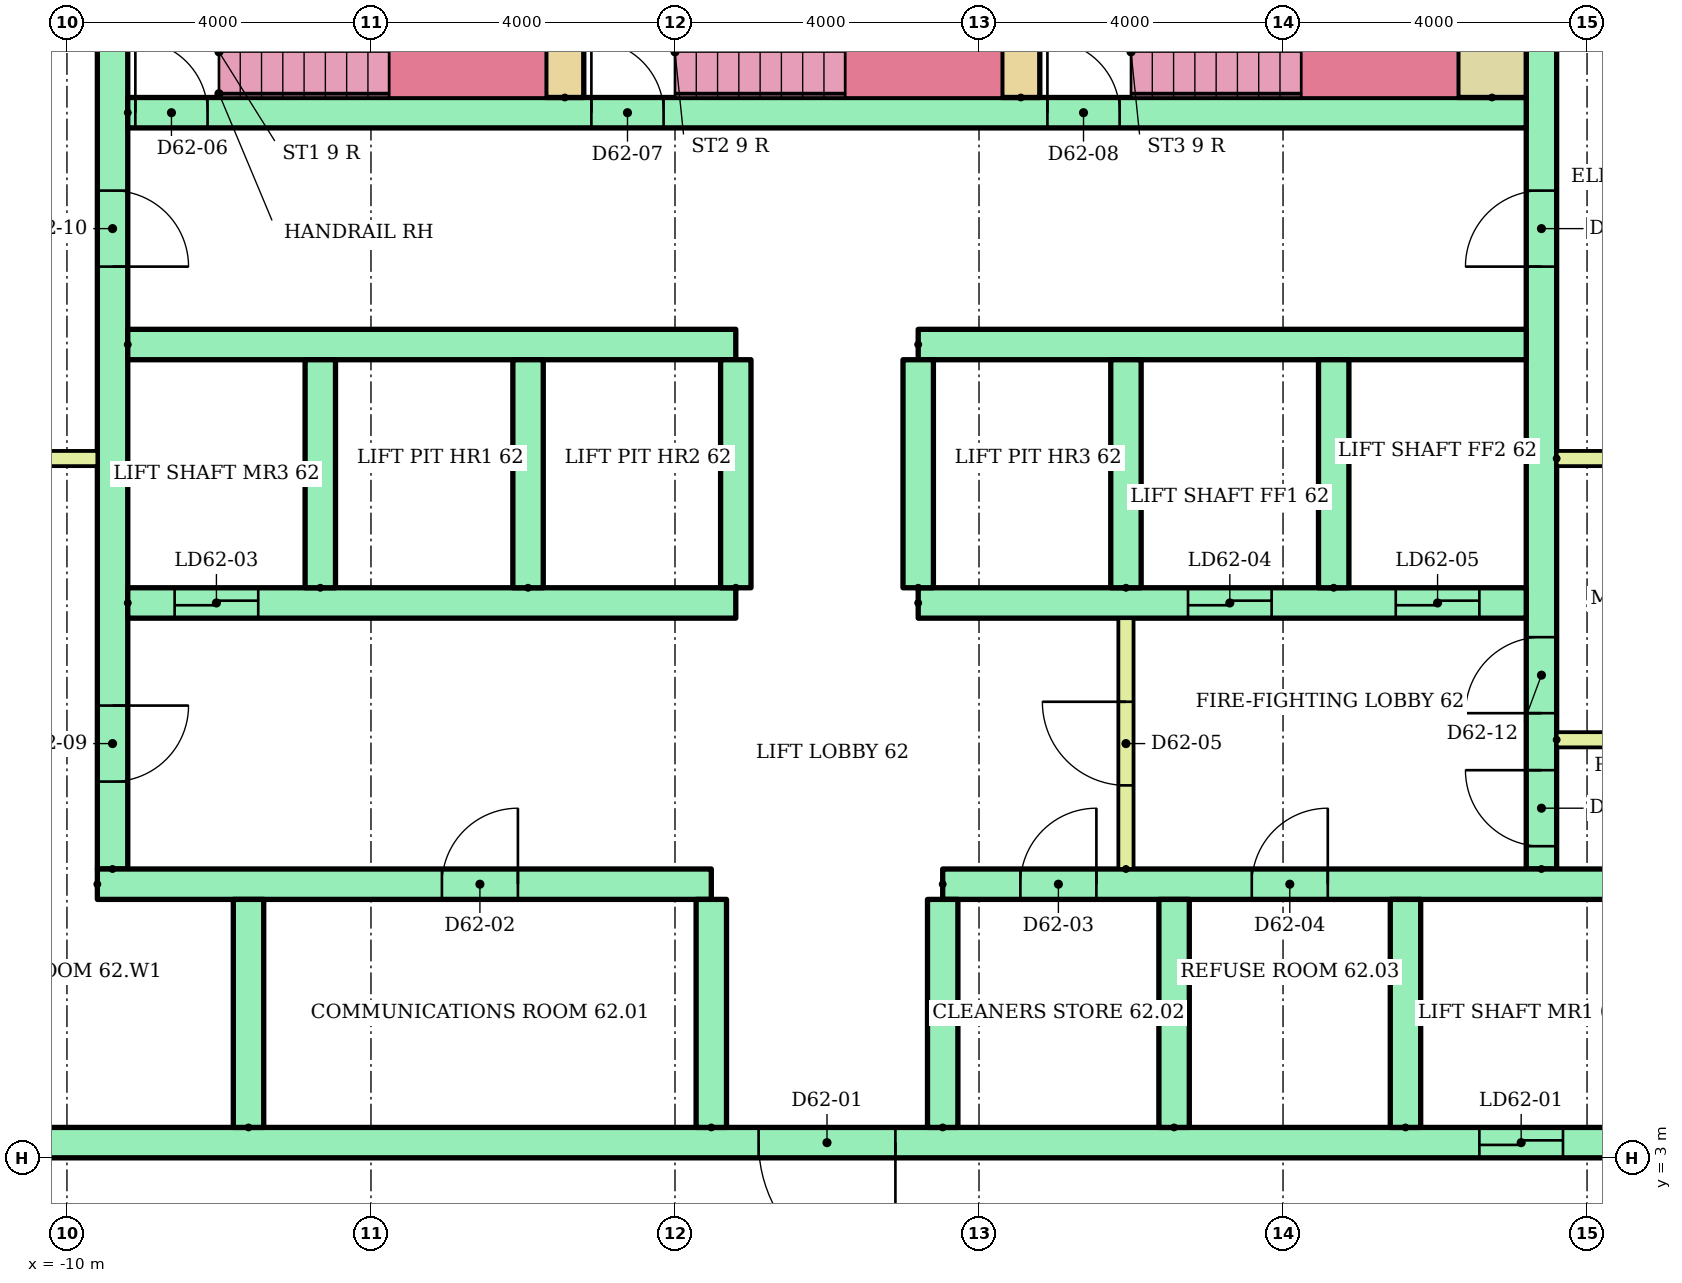
"""IFC4 building model, lengths in metres.
Left out: names, types, materials, properties, quantities, classifications, styles, units other than length and angle.
Written with IfcOpenShell. Run it as: python <this file> out.ifc"""

import sys

from ifc_helpers import new_model, si_unit, direction, frame, frame_2d, origin, place, context, subcontext, project, spatial, rectangle, extrude, element, fill, save


model = new_model("IFC4")
c1 = context("Model", 3, precision=1e-05, world=origin(), true_north=direction((0.0, 1.0)))
c2 = subcontext(c1, "Body", "Model", "MODEL_VIEW")
j1 = project(units=[si_unit("LENGTHUNIT", "METRE"), si_unit("PLANEANGLEUNIT", "RADIAN")], contexts=[c1])
p1 = place(None, origin())
s1 = spatial("IfcSite", under=j1, at=p1, CompositionType="ELEMENT")
p2 = place(p1, origin())
s2 = spatial("IfcBuilding", under=s1, at=p2, CompositionType="ELEMENT")
p3 = place(p2, frame((0.0, 0.0, 236.4)))
s3 = spatial("IfcBuildingStorey", under=s2, at=p3, CompositionType="ELEMENT", Elevation=236.4)
p4 = place(p3, frame((-9.4, 6.8, 0.0), z_axis=(0.0, 0.0, 1.0), x_axis=(0.0, 1.0, 0.0)))
e1 = element("IfcWall", 1, at=p4, inside=s3, PredefinedType="SHEAR", context=c2, shape_type="SweptSolid", body=[
    extrude(rectangle(XDim=12.7, YDim=0.4, at=frame_2d((6.35, 0.0))), origin(), (0.0, 0.0, 1.0), 2.8),
])
p5 = place(p4, frame((1.15, 0.0, 0.0)))
e2 = element("IfcOpeningElement", 2, at=p5, cuts=e1, PredefinedType="OPENING", context=c2, shape_type="SweptSolid", body=[
    extrude(rectangle(XDim=1.0, YDim=2.1, at=frame_2d((0.5, 1.05))), frame((0.0, 0.21, 0.0), z_axis=(0.0, -1.0, 0.0), x_axis=(1.0, 0.0, 0.0)), (0.0, 0.0, 1.0), 0.42),
])
p6 = place(p4, frame((7.925, 0.0, 0.0)))
e3 = element("IfcOpeningElement", 3, at=p6, cuts=e1, PredefinedType="OPENING", context=c2, shape_type="SweptSolid", body=[
    extrude(rectangle(XDim=1.0, YDim=2.1, at=frame_2d((0.5, 1.05))), frame((0.0, 0.21, 0.0), z_axis=(0.0, -1.0, 0.0), x_axis=(1.0, 0.0, 0.0)), (0.0, 0.0, 1.0), 0.42),
])
p7 = place(p3, frame((9.4, 6.8, 0.0), z_axis=(0.0, 0.0, 1.0), x_axis=(0.0, 1.0, 0.0)))
e4 = element("IfcWall", 4, at=p7, inside=s3, PredefinedType="SHEAR", context=c2, shape_type="SweptSolid", body=[
    extrude(rectangle(XDim=12.7, YDim=0.4, at=frame_2d((6.35, 0.0))), origin(), (0.0, 0.0, 1.0), 2.8),
])
p8 = place(p7, frame((0.3, 0.0, 0.0)))
e5 = element("IfcOpeningElement", 5, at=p8, cuts=e4, PredefinedType="OPENING", context=c2, shape_type="SweptSolid", body=[
    extrude(rectangle(XDim=1.0, YDim=2.1, at=frame_2d((0.5, 1.05))), frame((0.0, 0.21, 0.0), z_axis=(0.0, -1.0, 0.0), x_axis=(1.0, 0.0, 0.0)), (0.0, 0.0, 1.0), 0.42),
])
p9 = place(p7, frame((2.05, 0.0, 0.0)))
e6 = element("IfcOpeningElement", 6, at=p9, cuts=e4, PredefinedType="OPENING", context=c2, shape_type="SweptSolid", body=[
    extrude(rectangle(XDim=1.0, YDim=2.1, at=frame_2d((0.5, 1.05))), frame((0.0, 0.21, 0.0), z_axis=(0.0, -1.0, 0.0), x_axis=(1.0, 0.0, 0.0)), (0.0, 0.0, 1.0), 0.42),
])
p10 = place(p7, frame((7.925, 0.0, 0.0)))
e7 = element("IfcOpeningElement", 7, at=p10, cuts=e4, PredefinedType="OPENING", context=c2, shape_type="SweptSolid", body=[
    extrude(rectangle(XDim=1.0, YDim=2.1, at=frame_2d((0.5, 1.05))), frame((0.0, 0.21, 0.0), z_axis=(0.0, -1.0, 0.0), x_axis=(1.0, 0.0, 0.0)), (0.0, 0.0, 1.0), 0.42),
])
p11 = place(p3, frame((-13.5, 3.2, 0.0)))
e8 = element("IfcWall", 8, at=p11, inside=s3, PredefinedType="SHEAR", context=c2, shape_type="SweptSolid", body=[
    extrude(rectangle(XDim=27.0, YDim=0.4, at=frame_2d((13.5, 0.0))), origin(), (0.0, 0.0, 1.0), 2.8),
])
p12 = place(p11, frame((22.083, 0.0, 0.0)))
e9 = element("IfcOpeningElement", 9, at=p12, cuts=e8, PredefinedType="OPENING", context=c2, shape_type="SweptSolid", body=[
    extrude(rectangle(XDim=1.1, YDim=2.1, at=frame_2d((0.55, 1.05))), frame((0.0, 0.21, 0.0), z_axis=(0.0, -1.0, 0.0), x_axis=(1.0, 0.0, 0.0)), (0.0, 0.0, 1.0), 0.42),
])
p13 = place(p11, frame((25.128, 0.0, 0.0)))
e10 = element("IfcOpeningElement", 10, at=p13, cuts=e8, PredefinedType="OPENING", context=c2, shape_type="SweptSolid", body=[
    extrude(rectangle(XDim=1.1, YDim=2.1, at=frame_2d((0.55, 1.05))), frame((0.0, 0.21, 0.0), z_axis=(0.0, -1.0, 0.0), x_axis=(1.0, 0.0, 0.0)), (0.0, 0.0, 1.0), 0.42),
])
p14 = place(p11, frame((12.6, 0.0, 0.0)))
e11 = element("IfcOpeningElement", 11, at=p14, cuts=e8, PredefinedType="OPENING", context=c2, shape_type="SweptSolid", body=[
    extrude(rectangle(XDim=1.8, YDim=2.1, at=frame_2d((0.9, 1.05))), frame((0.0, 0.21, 0.0), z_axis=(0.0, -1.0, 0.0), x_axis=(1.0, 0.0, 0.0)), (0.0, 0.0, 1.0), 0.42),
])
p15 = place(p3, frame((-9.6, 6.6, 0.0)))
e12 = element("IfcWall", 12, at=p15, inside=s3, PredefinedType="SHEAR", context=c2, shape_type="SweptSolid", body=[
    extrude(rectangle(XDim=8.078, YDim=0.4, at=frame_2d((4.039, 0.0))), origin(), (0.0, 0.0, 1.0), 2.8),
])
p16 = place(p15, frame((4.533, 0.0, 0.0)))
e13 = element("IfcOpeningElement", 13, at=p16, cuts=e12, PredefinedType="OPENING", context=c2, shape_type="SweptSolid", body=[
    extrude(rectangle(XDim=1.0, YDim=2.1, at=frame_2d((0.5, 1.05))), frame((0.0, 0.21, 0.0), z_axis=(0.0, -1.0, 0.0), x_axis=(1.0, 0.0, 0.0)), (0.0, 0.0, 1.0), 0.42),
])
p17 = place(p3, frame((1.522, 6.6, 0.0)))
e14 = element("IfcWall", 14, at=p17, inside=s3, PredefinedType="SHEAR", context=c2, shape_type="SweptSolid", body=[
    extrude(rectangle(XDim=11.978, YDim=0.4, at=frame_2d((5.989, 0.0))), origin(), (0.0, 0.0, 1.0), 2.8),
])
p18 = place(p17, frame((1.022, 0.0, 0.0)))
e15 = element("IfcOpeningElement", 15, at=p18, cuts=e14, PredefinedType="OPENING", context=c2, shape_type="SweptSolid", body=[
    extrude(rectangle(XDim=1.0, YDim=2.1, at=frame_2d((0.5, 1.05))), frame((0.0, 0.21, 0.0), z_axis=(0.0, -1.0, 0.0), x_axis=(1.0, 0.0, 0.0)), (0.0, 0.0, 1.0), 0.42),
])
p19 = place(p17, frame((4.067, 0.0, 0.0)))
e16 = element("IfcOpeningElement", 16, at=p19, cuts=e14, PredefinedType="OPENING", context=c2, shape_type="SweptSolid", body=[
    extrude(rectangle(XDim=1.0, YDim=2.1, at=frame_2d((0.5, 1.05))), frame((0.0, 0.21, 0.0), z_axis=(0.0, -1.0, 0.0), x_axis=(1.0, 0.0, 0.0)), (0.0, 0.0, 1.0), 0.42),
])
for number, where, z_axis, x_axis in (
    (17, (-7.611, 3.4, 0.0), (0.0, 0.0, 1.0), (0.0, 1.0, 0.0)),
    (18, (-1.522, 3.4, 0.0), (0.0, 0.0, 1.0), (0.0, 1.0, 0.0)),
    (19, (1.522, 3.4, 0.0), (0.0, 0.0, 1.0), (0.0, 1.0, 0.0)),
    (20, (4.567, 3.4, 0.0), (0.0, 0.0, 1.0), (0.0, 1.0, 0.0)),
    (21, (7.611, 3.4, 0.0), (0.0, 0.0, 1.0), (0.0, 1.0, 0.0)),
):
    element("IfcWall", number, at=place(p3, frame(where, z_axis=z_axis, x_axis=x_axis)), inside=s3, PredefinedType="SHEAR", context=c2, shape_type="SweptSolid", body=[
        extrude(rectangle(XDim=3.0, YDim=0.4, at=frame_2d((1.5, 0.0))), origin(), (0.0, 0.0, 1.0), 2.8),
    ])
p20 = place(p3, frame((-9.2, 10.3, 0.0)))
e22 = element("IfcWall", 22, at=p20, inside=s3, PredefinedType="SHEAR", context=c2, shape_type="SweptSolid", body=[
    extrude(rectangle(XDim=8.0, YDim=0.4, at=frame_2d((4.0, 0.0))), origin(), (0.0, 0.0, 1.0), 2.8),
])
p21 = place(p20, frame((0.617, 0.0, 0.0)))
e23 = element("IfcOpeningElement", 23, at=p21, cuts=e22, PredefinedType="OPENING", context=c2, shape_type="SweptSolid", body=[
    extrude(rectangle(XDim=1.1, YDim=2.1, at=frame_2d((0.55, 1.05))), frame((0.0, 0.21, 0.0), z_axis=(0.0, -1.0, 0.0), x_axis=(1.0, 0.0, 0.0)), (0.0, 0.0, 1.0), 0.42),
])
p22 = place(p3, frame((-9.2, 13.7, 0.0)))
e24 = element("IfcWall", 24, at=p22, inside=s3, PredefinedType="SHEAR", context=c2, shape_type="SweptSolid", body=[
    extrude(rectangle(XDim=8.0, YDim=0.4, at=frame_2d((4.0, 0.0))), origin(), (0.0, 0.0, 1.0), 2.8),
])
p23 = place(p3, frame((1.2, 10.3, 0.0)))
e25 = element("IfcWall", 25, at=p23, inside=s3, PredefinedType="SHEAR", context=c2, shape_type="SweptSolid", body=[
    extrude(rectangle(XDim=8.0, YDim=0.4, at=frame_2d((4.0, 0.0))), origin(), (0.0, 0.0, 1.0), 2.8),
])
p24 = place(p23, frame((3.55, 0.0, 0.0)))
e26 = element("IfcOpeningElement", 26, at=p24, cuts=e25, PredefinedType="OPENING", context=c2, shape_type="SweptSolid", body=[
    extrude(rectangle(XDim=1.1, YDim=2.1, at=frame_2d((0.55, 1.05))), frame((0.0, 0.21, 0.0), z_axis=(0.0, -1.0, 0.0), x_axis=(1.0, 0.0, 0.0)), (0.0, 0.0, 1.0), 0.42),
])
p25 = place(p23, frame((6.283, 0.0, 0.0)))
e27 = element("IfcOpeningElement", 27, at=p25, cuts=e25, PredefinedType="OPENING", context=c2, shape_type="SweptSolid", body=[
    extrude(rectangle(XDim=1.1, YDim=2.1, at=frame_2d((0.55, 1.05))), frame((0.0, 0.21, 0.0), z_axis=(0.0, -1.0, 0.0), x_axis=(1.0, 0.0, 0.0)), (0.0, 0.0, 1.0), 0.42),
])
p26 = place(p3, frame((1.2, 13.7, 0.0)))
e28 = element("IfcWall", 28, at=p26, inside=s3, PredefinedType="SHEAR", context=c2, shape_type="SweptSolid", body=[
    extrude(rectangle(XDim=8.0, YDim=0.4, at=frame_2d((4.0, 0.0))), origin(), (0.0, 0.0, 1.0), 2.8),
])
for number, where, z_axis, x_axis in (
    (29, (-6.667, 10.5, 0.0), (0.0, 0.0, 1.0), (0.0, 1.0, 0.0)),
    (30, (-3.933, 10.5, 0.0), (0.0, 0.0, 1.0), (0.0, 1.0, 0.0)),
    (31, (-1.2, 10.5, 0.0), (0.0, 0.0, 1.0), (0.0, 1.0, 0.0)),
    (32, (1.2, 10.5, 0.0), (0.0, 0.0, 1.0), (0.0, 1.0, 0.0)),
    (33, (3.933, 10.5, 0.0), (0.0, 0.0, 1.0), (0.0, 1.0, 0.0)),
    (34, (6.667, 10.5, 0.0), (0.0, 0.0, 1.0), (0.0, 1.0, 0.0)),
):
    element("IfcWall", number, at=place(p3, frame(where, z_axis=z_axis, x_axis=x_axis)), inside=s3, PredefinedType="SHEAR", context=c2, shape_type="SweptSolid", body=[
        extrude(rectangle(XDim=3.0, YDim=0.4, at=frame_2d((1.5, 0.0))), origin(), (0.0, 0.0, 1.0), 2.8),
    ])
p27 = place(p3, frame((3.933, 6.8, 0.0), z_axis=(0.0, 0.0, 1.0), x_axis=(0.0, 1.0, 0.0)))
e35 = element("IfcWall", 35, at=p27, inside=s3, PredefinedType="PARTITIONING", context=c2, shape_type="SweptSolid", body=[
    extrude(rectangle(XDim=3.3, YDim=0.2, at=frame_2d((1.65, 0.0))), origin(), (0.0, 0.0, 1.0), 2.8),
])
p28 = place(p27, frame((1.1, 0.0, 0.0)))
e36 = element("IfcOpeningElement", 36, at=p28, cuts=e35, PredefinedType="OPENING", context=c2, shape_type="SweptSolid", body=[
    extrude(rectangle(XDim=1.1, YDim=2.1, at=frame_2d((0.55, 1.05))), frame((0.0, 0.11, 0.0), z_axis=(0.0, -1.0, 0.0), x_axis=(1.0, 0.0, 0.0)), (0.0, 0.0, 1.0), 0.22),
])
p29 = place(p3, frame((-9.2, 16.75, 0.0)))
e37 = element("IfcWall", 37, at=p29, inside=s3, PredefinedType="SHEAR", context=c2, shape_type="SweptSolid", body=[
    extrude(rectangle(XDim=18.4, YDim=0.4, at=frame_2d((9.2, 0.0))), origin(), (0.0, 0.0, 1.0), 2.8),
])
p30 = place(p29, frame((0.1, 0.0, 0.0)))
e38 = element("IfcOpeningElement", 38, at=p30, cuts=e37, PredefinedType="OPENING", context=c2, shape_type="SweptSolid", body=[
    extrude(rectangle(XDim=0.95, YDim=2.1, at=frame_2d((0.475, 1.05))), frame((0.0, 0.21, 0.0), z_axis=(0.0, -1.0, 0.0), x_axis=(1.0, 0.0, 0.0)), (0.0, 0.0, 1.0), 0.42),
])
p31 = place(p29, frame((6.1, 0.0, 0.0)))
e39 = element("IfcOpeningElement", 39, at=p31, cuts=e37, PredefinedType="OPENING", context=c2, shape_type="SweptSolid", body=[
    extrude(rectangle(XDim=0.95, YDim=2.1, at=frame_2d((0.475, 1.05))), frame((0.0, 0.21, 0.0), z_axis=(0.0, -1.0, 0.0), x_axis=(1.0, 0.0, 0.0)), (0.0, 0.0, 1.0), 0.42),
])
p32 = place(p29, frame((12.1, 0.0, 0.0)))
e40 = element("IfcOpeningElement", 40, at=p32, cuts=e37, PredefinedType="OPENING", context=c2, shape_type="SweptSolid", body=[
    extrude(rectangle(XDim=0.95, YDim=2.1, at=frame_2d((0.475, 1.05))), frame((0.0, 0.21, 0.0), z_axis=(0.0, -1.0, 0.0), x_axis=(1.0, 0.0, 0.0)), (0.0, 0.0, 1.0), 0.42),
])
for number, where, z_axis, x_axis in (
    (41, (-3.45, 16.95, 0.0), (0.0, 0.0, 1.0), (0.0, 1.0, 0.0)),
    (42, (2.55, 16.95, 0.0), (0.0, 0.0, 1.0), (0.0, 1.0, 0.0)),
):
    element("IfcWall", number, at=place(p3, frame(where, z_axis=z_axis, x_axis=x_axis)), inside=s3, PredefinedType="SHEAR", context=c2, shape_type="SweptSolid", body=[
        extrude(rectangle(XDim=2.55, YDim=0.5, at=frame_2d((1.275, 0.0))), origin(), (0.0, 0.0, 1.0), 2.8),
    ])
p33 = place(p3, frame((8.75, 16.95, 0.0), z_axis=(0.0, 0.0, 1.0), x_axis=(0.0, 1.0, 0.0)))
e43 = element("IfcWall", 43, at=p33, inside=s3, PredefinedType="SHEAR", context=c2, shape_type="SweptSolid", body=[
    extrude(rectangle(XDim=2.55, YDim=0.9, at=frame_2d((1.275, 0.0))), origin(), (0.0, 0.0, 1.0), 2.8),
])
for number, where in (
    (44, (-13.5, 12.2, 0.0)),
    (45, (9.6, 8.5, 0.0)),
    (46, (9.6, 12.2, 0.0)),
):
    element("IfcWall", number, at=place(p3, frame(where)), inside=s3, PredefinedType="PARTITIONING", context=c2, shape_type="SweptSolid", body=[
        extrude(rectangle(XDim=3.9, YDim=0.2, at=frame_2d((1.95, 0.0))), origin(), (0.0, 0.0, 1.0), 2.8),
    ])
p34 = place(p12, origin())
e47 = element("IfcDoor", 47, at=p34, inside=s3, OperationType="SLIDING_TO_LEFT", PredefinedType="DOOR", context=c2, shape_type="SweptSolid", body=[
    extrude(rectangle(XDim=1.1, YDim=2.1, at=frame_2d((0.55, 1.05))), frame((0.0, 0.025, 0.0), z_axis=(0.0, -1.0, 0.0), x_axis=(1.0, 0.0, 0.0)), (0.0, 0.0, 1.0), 0.05),
])
fill(e9, e47)
p35 = place(p14, frame((1.8, 0.0, 0.0), z_axis=(0.0, 0.0, 1.0), x_axis=(-1.0, 0.0, 0.0)))
e48 = element("IfcDoor", 48, at=p35, inside=s3, OperationType="DOUBLE_DOOR_SINGLE_SWING", PredefinedType="DOOR", context=c2, shape_type="SweptSolid", body=[
    extrude(rectangle(XDim=1.8, YDim=2.1, at=frame_2d((0.9, 1.05))), frame((0.0, 0.025, 0.0), z_axis=(0.0, -1.0, 0.0), x_axis=(1.0, 0.0, 0.0)), (0.0, 0.0, 1.0), 0.05),
])
fill(e11, e48)
p36 = place(p16, origin())
e49 = element("IfcDoor", 49, at=p36, inside=s3, OperationType="SINGLE_SWING_RIGHT", PredefinedType="DOOR", context=c2, shape_type="SweptSolid", body=[
    extrude(rectangle(XDim=1.0, YDim=2.1, at=frame_2d((0.5, 1.05))), frame((0.0, 0.025, 0.0), z_axis=(0.0, -1.0, 0.0), x_axis=(1.0, 0.0, 0.0)), (0.0, 0.0, 1.0), 0.05),
])
fill(e13, e49)
p37 = place(p18, origin())
e50 = element("IfcDoor", 50, at=p37, inside=s3, OperationType="SINGLE_SWING_RIGHT", PredefinedType="DOOR", context=c2, shape_type="SweptSolid", body=[
    extrude(rectangle(XDim=1.0, YDim=2.1, at=frame_2d((0.5, 1.05))), frame((0.0, 0.025, 0.0), z_axis=(0.0, -1.0, 0.0), x_axis=(1.0, 0.0, 0.0)), (0.0, 0.0, 1.0), 0.05),
])
fill(e15, e50)
p38 = place(p19, origin())
e51 = element("IfcDoor", 51, at=p38, inside=s3, OperationType="SINGLE_SWING_RIGHT", PredefinedType="DOOR", context=c2, shape_type="SweptSolid", body=[
    extrude(rectangle(XDim=1.0, YDim=2.1, at=frame_2d((0.5, 1.05))), frame((0.0, 0.025, 0.0), z_axis=(0.0, -1.0, 0.0), x_axis=(1.0, 0.0, 0.0)), (0.0, 0.0, 1.0), 0.05),
])
fill(e16, e51)
p39 = place(p21, origin())
e52 = element("IfcDoor", 52, at=p39, inside=s3, OperationType="SLIDING_TO_LEFT", PredefinedType="DOOR", context=c2, shape_type="SweptSolid", body=[
    extrude(rectangle(XDim=1.1, YDim=2.1, at=frame_2d((0.55, 1.05))), frame((0.0, 0.025, 0.0), z_axis=(0.0, -1.0, 0.0), x_axis=(1.0, 0.0, 0.0)), (0.0, 0.0, 1.0), 0.05),
])
fill(e23, e52)
p40 = place(p24, origin())
e53 = element("IfcDoor", 53, at=p40, inside=s3, OperationType="SLIDING_TO_LEFT", PredefinedType="DOOR", context=c2, shape_type="SweptSolid", body=[
    extrude(rectangle(XDim=1.1, YDim=2.1, at=frame_2d((0.55, 1.05))), frame((0.0, 0.025, 0.0), z_axis=(0.0, -1.0, 0.0), x_axis=(1.0, 0.0, 0.0)), (0.0, 0.0, 1.0), 0.05),
])
fill(e26, e53)
p41 = place(p25, origin())
e54 = element("IfcDoor", 54, at=p41, inside=s3, OperationType="SLIDING_TO_LEFT", PredefinedType="DOOR", context=c2, shape_type="SweptSolid", body=[
    extrude(rectangle(XDim=1.1, YDim=2.1, at=frame_2d((0.55, 1.05))), frame((0.0, 0.025, 0.0), z_axis=(0.0, -1.0, 0.0), x_axis=(1.0, 0.0, 0.0)), (0.0, 0.0, 1.0), 0.05),
])
fill(e27, e54)
p42 = place(p28, origin())
e55 = element("IfcDoor", 55, at=p42, inside=s3, OperationType="SINGLE_SWING_RIGHT", PredefinedType="DOOR", context=c2, shape_type="SweptSolid", body=[
    extrude(rectangle(XDim=1.1, YDim=2.1, at=frame_2d((0.55, 1.05))), frame((0.0, 0.025, 0.0), z_axis=(0.0, -1.0, 0.0), x_axis=(1.0, 0.0, 0.0)), (0.0, 0.0, 1.0), 0.05),
])
fill(e36, e55)
p43 = place(p30, origin())
e56 = element("IfcDoor", 56, at=p43, inside=s3, OperationType="SINGLE_SWING_LEFT", PredefinedType="DOOR", context=c2, shape_type="SweptSolid", body=[
    extrude(rectangle(XDim=0.95, YDim=2.1, at=frame_2d((0.475, 1.05))), frame((0.0, 0.025, 0.0), z_axis=(0.0, -1.0, 0.0), x_axis=(1.0, 0.0, 0.0)), (0.0, 0.0, 1.0), 0.05),
])
fill(e38, e56)
p44 = place(p31, origin())
e57 = element("IfcDoor", 57, at=p44, inside=s3, OperationType="SINGLE_SWING_LEFT", PredefinedType="DOOR", context=c2, shape_type="SweptSolid", body=[
    extrude(rectangle(XDim=0.95, YDim=2.1, at=frame_2d((0.475, 1.05))), frame((0.0, 0.025, 0.0), z_axis=(0.0, -1.0, 0.0), x_axis=(1.0, 0.0, 0.0)), (0.0, 0.0, 1.0), 0.05),
])
fill(e39, e57)
p45 = place(p32, origin())
e58 = element("IfcDoor", 58, at=p45, inside=s3, OperationType="SINGLE_SWING_LEFT", PredefinedType="DOOR", context=c2, shape_type="SweptSolid", body=[
    extrude(rectangle(XDim=0.95, YDim=2.1, at=frame_2d((0.475, 1.05))), frame((0.0, 0.025, 0.0), z_axis=(0.0, -1.0, 0.0), x_axis=(1.0, 0.0, 0.0)), (0.0, 0.0, 1.0), 0.05),
])
fill(e40, e58)
p46 = place(p5, frame((1.0, 0.0, 0.0), z_axis=(0.0, 0.0, 1.0), x_axis=(-1.0, 0.0, 0.0)))
e59 = element("IfcDoor", 59, at=p46, inside=s3, OperationType="SINGLE_SWING_RIGHT", PredefinedType="DOOR", context=c2, shape_type="SweptSolid", body=[
    extrude(rectangle(XDim=1.0, YDim=2.1, at=frame_2d((0.5, 1.05))), frame((0.0, 0.025, 0.0), z_axis=(0.0, -1.0, 0.0), x_axis=(1.0, 0.0, 0.0)), (0.0, 0.0, 1.0), 0.05),
])
fill(e2, e59)
p47 = place(p6, frame((1.0, 0.0, 0.0), z_axis=(0.0, 0.0, 1.0), x_axis=(-1.0, 0.0, 0.0)))
e60 = element("IfcDoor", 60, at=p47, inside=s3, OperationType="SINGLE_SWING_LEFT", PredefinedType="DOOR", context=c2, shape_type="SweptSolid", body=[
    extrude(rectangle(XDim=1.0, YDim=2.1, at=frame_2d((0.5, 1.05))), frame((0.0, 0.025, 0.0), z_axis=(0.0, -1.0, 0.0), x_axis=(1.0, 0.0, 0.0)), (0.0, 0.0, 1.0), 0.05),
])
fill(e3, e60)
p48 = place(p8, origin())
e61 = element("IfcDoor", 61, at=p48, inside=s3, OperationType="SINGLE_SWING_RIGHT", PredefinedType="DOOR", context=c2, shape_type="SweptSolid", body=[
    extrude(rectangle(XDim=1.0, YDim=2.1, at=frame_2d((0.5, 1.05))), frame((0.0, 0.025, 0.0), z_axis=(0.0, -1.0, 0.0), x_axis=(1.0, 0.0, 0.0)), (0.0, 0.0, 1.0), 0.05),
])
fill(e5, e61)
p49 = place(p9, origin())
e62 = element("IfcDoor", 62, at=p49, inside=s3, OperationType="SINGLE_SWING_LEFT", PredefinedType="DOOR", context=c2, shape_type="SweptSolid", body=[
    extrude(rectangle(XDim=1.0, YDim=2.1, at=frame_2d((0.5, 1.05))), frame((0.0, 0.025, 0.0), z_axis=(0.0, -1.0, 0.0), x_axis=(1.0, 0.0, 0.0)), (0.0, 0.0, 1.0), 0.05),
])
fill(e6, e62)
p50 = place(p10, origin())
e63 = element("IfcDoor", 63, at=p50, inside=s3, OperationType="SINGLE_SWING_LEFT", PredefinedType="DOOR", context=c2, shape_type="SweptSolid", body=[
    extrude(rectangle(XDim=1.0, YDim=2.1, at=frame_2d((0.5, 1.05))), frame((0.0, 0.025, 0.0), z_axis=(0.0, -1.0, 0.0), x_axis=(1.0, 0.0, 0.0)), (0.0, 0.0, 1.0), 0.05),
])
fill(e7, e63)
save(model, sys.argv[1])
